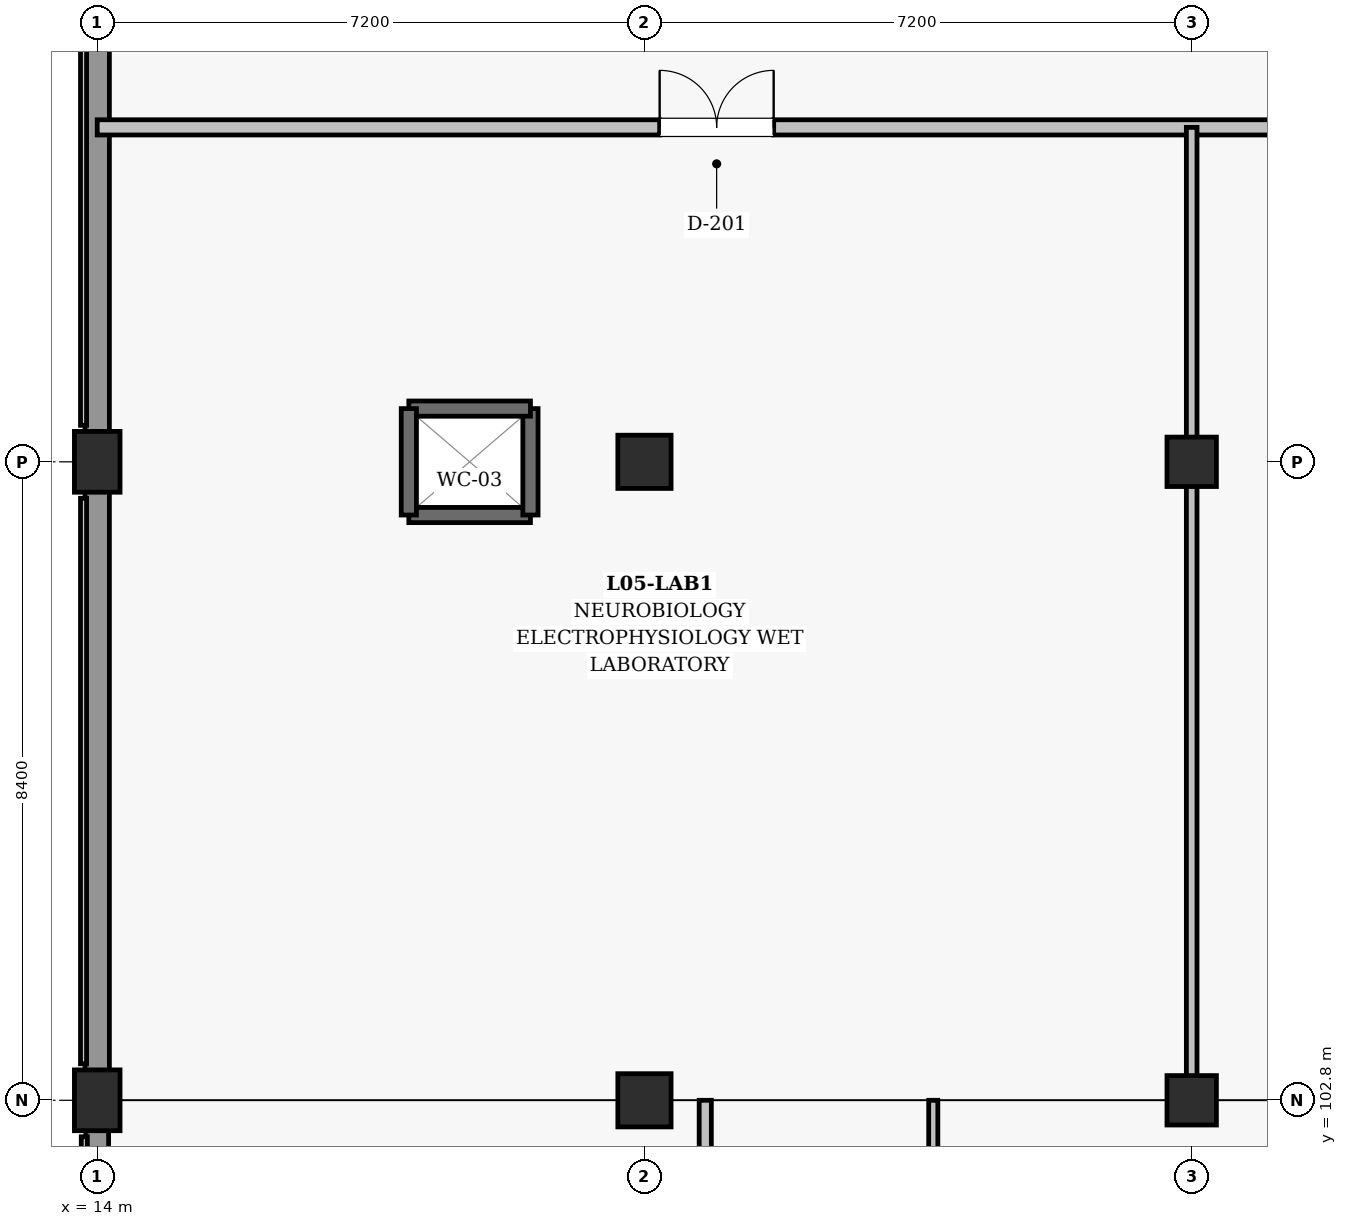
"""IFC4 building model, lengths in metres.
Left out: names, types, materials, properties, quantities, classifications, styles, units other than length and angle.
Written with IfcOpenShell. Run it as: python <this file> out.ifc"""

import sys

from ifc_helpers import new_model, si_unit, direction, frame, frame_2d, origin, origin_2d, place, context, subcontext, project, spatial, rectangle, extrude, element, fill, save


model = new_model("IFC4")
c1 = context("Model", 3, precision=1e-05, world=origin(), true_north=direction((0.0, 1.0)))
c2 = subcontext(c1, "Body", "Model", "MODEL_VIEW")
j1 = project(units=[si_unit("LENGTHUNIT", "METRE"), si_unit("PLANEANGLEUNIT", "RADIAN")], contexts=[c1])
p1 = place(None, origin())
s1 = spatial("IfcSite", under=j1, at=p1, CompositionType="ELEMENT")
p2 = place(p1, origin())
s2 = spatial("IfcBuilding", under=s1, at=p2, CompositionType="ELEMENT")
p3 = place(p2, frame((0.0, 0.0, 23.4)))
s3 = spatial("IfcBuildingStorey", under=s2, at=p3, CompositionType="ELEMENT", Elevation=23.4)
for number, where, z_axis, x_axis in (
    (1, (14.0, 102.8, 0.0), (0.0, 0.0, 1.0), (1.0, 0.0, 0.0)),
    (2, (14.0, 111.2, 0.0), (0.0, 0.0, 1.0), (1.0, 0.0, 0.0)),
):
    element("IfcColumn", number, at=place(p3, frame(where, z_axis=z_axis, x_axis=x_axis)), inside=s3, PredefinedType="COLUMN", context=c2, shape_type="SweptSolid", body=[
        extrude(rectangle(XDim=0.6, YDim=0.8, at=origin_2d()), origin(), (0.0, 0.0, 1.0), 4.5),
    ])
for number, where, z_axis, x_axis in (
    (3, (21.2, 102.8, 0.0), (0.0, 0.0, 1.0), (1.0, 0.0, 0.0)),
    (4, (21.2, 111.2, 0.0), (0.0, 0.0, 1.0), (1.0, 0.0, 0.0)),
):
    element("IfcColumn", number, at=place(p3, frame(where, z_axis=z_axis, x_axis=x_axis)), inside=s3, PredefinedType="COLUMN", context=c2, shape_type="SweptSolid", body=[
        extrude(rectangle(XDim=0.7, YDim=0.7, at=origin_2d()), origin(), (0.0, 0.0, 1.0), 4.5),
    ])
for number, where, z_axis, x_axis in (
    (5, (28.4, 102.8, 0.0), (0.0, 0.0, 1.0), (1.0, 0.0, 0.0)),
    (6, (28.4, 111.2, 0.0), (0.0, 0.0, 1.0), (1.0, 0.0, 0.0)),
):
    element("IfcColumn", number, at=place(p3, frame(where, z_axis=z_axis, x_axis=x_axis)), inside=s3, PredefinedType="COLUMN", context=c2, shape_type="SweptSolid", body=[
        extrude(rectangle(XDim=0.65, YDim=0.65, at=origin_2d()), origin(), (0.0, 0.0, 1.0), 4.5),
    ])
p4 = place(p3, frame((14.0, 103.18, 0.0), z_axis=(0.0, 0.0, 1.0), x_axis=(0.0, 1.0, 0.0)))
e7 = element("IfcWall", 7, at=p4, inside=s3, PredefinedType="SOLIDWALL", context=c2, shape_type="SweptSolid", body=[
    extrude(rectangle(XDim=7.64, YDim=0.32, at=frame_2d((3.82, 0.0))), origin(), (0.0, 0.0, 1.0), 3.355),
])
p5 = place(p3, frame((14.0, 111.58, 0.0), z_axis=(0.0, 0.0, 1.0), x_axis=(0.0, 1.0, 0.0)))
e8 = element("IfcWall", 8, at=p5, inside=s3, PredefinedType="SOLIDWALL", context=c2, shape_type="SweptSolid", body=[
    extrude(rectangle(XDim=7.715, YDim=0.32, at=frame_2d((3.857, 0.0))), origin(), (0.0, 0.0, 1.0), 3.405),
])
p6 = place(p3, frame((14.0, 94.755, 0.0), z_axis=(0.0, 0.0, 1.0), x_axis=(0.0, 1.0, 0.0)))
e9 = element("IfcWall", 9, at=p6, inside=s3, PredefinedType="SOLIDWALL", context=c2, shape_type="SweptSolid", body=[
    extrude(rectangle(XDim=7.665, YDim=0.3, at=frame_2d((3.833, 0.0))), origin(), (0.0, 0.0, 1.0), 3.355),
])
p7 = place(p3, frame((18.1, 110.5, 0.0), z_axis=(0.0, 0.0, 1.0), x_axis=(1.0, 0.0, 0.0)))
e10 = element("IfcWall", 10, at=p7, inside=s3, PredefinedType="SHEAR", context=c2, shape_type="SweptSolid", body=[
    extrude(rectangle(XDim=1.6, YDim=0.2, at=frame_2d((0.8, 0.0))), origin(), (0.0, 0.0, 1.0), 4.14),
])
p8 = place(p3, frame((19.7, 110.5, 0.0), z_axis=(0.0, 0.0, 1.0), x_axis=(0.0, 1.0, 0.0)))
e11 = element("IfcWall", 11, at=p8, inside=s3, PredefinedType="SHEAR", context=c2, shape_type="SweptSolid", body=[
    extrude(rectangle(XDim=1.4, YDim=0.2, at=frame_2d((0.7, 0.0))), origin(), (0.0, 0.0, 1.0), 4.14),
])
p9 = place(p3, frame((19.7, 111.9, 0.0), z_axis=(0.0, 0.0, 1.0), x_axis=(-1.0, 0.0, 0.0)))
e12 = element("IfcWall", 12, at=p9, inside=s3, PredefinedType="SHEAR", context=c2, shape_type="SweptSolid", body=[
    extrude(rectangle(XDim=1.6, YDim=0.2, at=frame_2d((0.8, 0.0))), origin(), (0.0, 0.0, 1.0), 4.14),
])
p10 = place(p3, frame((18.1, 111.9, 0.0), z_axis=(0.0, 0.0, 1.0), x_axis=(0.0, -1.0, 0.0)))
e13 = element("IfcWall", 13, at=p10, inside=s3, PredefinedType="SHEAR", context=c2, shape_type="SweptSolid", body=[
    extrude(rectangle(XDim=1.4, YDim=0.2, at=frame_2d((0.7, 0.0))), origin(), (0.0, 0.0, 1.0), 4.14),
])
p11 = place(p3, frame((14.0, 115.6, 0.0), z_axis=(0.0, 0.0, 1.0), x_axis=(1.0, 0.0, 0.0)))
e14 = element("IfcWall", 14, at=p11, inside=s3, PredefinedType="SOLIDWALL", context=c2, shape_type="SweptSolid", body=[
    extrude(rectangle(XDim=100.8, YDim=0.2, at=frame_2d((50.4, 0.0))), origin(), (0.0, 0.0, 1.0), 2.96),
])
p12 = place(p11, frame((29.9, 0.0, 0.0)))
e15 = element("IfcOpeningElement", 15, at=p12, cuts=e14, PredefinedType="OPENING", context=c2, shape_type="SweptSolid", body=[
    extrude(rectangle(XDim=1.1, YDim=2.15, at=frame_2d((0.55, 1.075))), frame((0.0, 0.11, 0.0), z_axis=(0.0, -1.0, 0.0), x_axis=(1.0, 0.0, 0.0)), (0.0, 0.0, 1.0), 0.22),
])
p13 = place(p11, frame((7.4, 0.0, 0.0)))
e16 = element("IfcOpeningElement", 16, at=p13, cuts=e14, PredefinedType="OPENING", context=c2, shape_type="SweptSolid", body=[
    extrude(rectangle(XDim=1.5, YDim=2.2, at=frame_2d((0.75, 1.1))), frame((0.0, 0.11, 0.0), z_axis=(0.0, -1.0, 0.0), x_axis=(1.0, 0.0, 0.0)), (0.0, 0.0, 1.0), 0.22),
])
p14 = place(p11, frame((23.8, 0.0, 0.0)))
e17 = element("IfcOpeningElement", 17, at=p14, cuts=e14, PredefinedType="OPENING", context=c2, shape_type="SweptSolid", body=[
    extrude(rectangle(XDim=1.5, YDim=2.2, at=frame_2d((0.75, 1.1))), frame((0.0, 0.11, 0.0), z_axis=(0.0, -1.0, 0.0), x_axis=(1.0, 0.0, 0.0)), (0.0, 0.0, 1.0), 0.22),
])
p15 = place(p11, frame((39.4, 0.0, 0.0)))
e18 = element("IfcOpeningElement", 18, at=p15, cuts=e14, PredefinedType="OPENING", context=c2, shape_type="SweptSolid", body=[
    extrude(rectangle(XDim=1.5, YDim=2.2, at=frame_2d((0.75, 1.1))), frame((0.0, 0.11, 0.0), z_axis=(0.0, -1.0, 0.0), x_axis=(1.0, 0.0, 0.0)), (0.0, 0.0, 1.0), 0.22),
])
p16 = place(p11, frame((54.9, 0.0, 0.0)))
e19 = element("IfcOpeningElement", 19, at=p16, cuts=e14, PredefinedType="OPENING", context=c2, shape_type="SweptSolid", body=[
    extrude(rectangle(XDim=1.5, YDim=2.2, at=frame_2d((0.75, 1.1))), frame((0.0, 0.11, 0.0), z_axis=(0.0, -1.0, 0.0), x_axis=(1.0, 0.0, 0.0)), (0.0, 0.0, 1.0), 0.22),
])
p17 = place(p11, frame((74.9, 0.0, 0.0)))
e20 = element("IfcOpeningElement", 20, at=p17, cuts=e14, PredefinedType="OPENING", context=c2, shape_type="SweptSolid", body=[
    extrude(rectangle(XDim=1.5, YDim=2.2, at=frame_2d((0.75, 1.1))), frame((0.0, 0.11, 0.0), z_axis=(0.0, -1.0, 0.0), x_axis=(1.0, 0.0, 0.0)), (0.0, 0.0, 1.0), 0.22),
])
p18 = place(p11, frame((91.6, 0.0, 0.0)))
e21 = element("IfcOpeningElement", 21, at=p18, cuts=e14, PredefinedType="OPENING", context=c2, shape_type="SweptSolid", body=[
    extrude(rectangle(XDim=1.5, YDim=2.2, at=frame_2d((0.75, 1.1))), frame((0.0, 0.11, 0.0), z_axis=(0.0, -1.0, 0.0), x_axis=(1.0, 0.0, 0.0)), (0.0, 0.0, 1.0), 0.22),
])
p19 = place(p3, frame((28.4, 102.8, 0.0), z_axis=(0.0, 0.0, 1.0), x_axis=(0.0, 1.0, 0.0)))
e22 = element("IfcWall", 22, at=p19, inside=s3, PredefinedType="PARTITIONING", context=c2, shape_type="SweptSolid", body=[
    extrude(rectangle(XDim=12.8, YDim=0.14, at=frame_2d((6.4, 0.0))), origin(), (0.0, 0.0, 1.0), 3.36),
])
p20 = place(p3, frame((25.0, 28.4, 0.0), z_axis=(0.0, 0.0, 1.0), x_axis=(0.0, 1.0, 0.0)))
e23 = element("IfcWall", 23, at=p20, inside=s3, PredefinedType="PARTITIONING", context=c2, shape_type="SweptSolid", body=[
    extrude(rectangle(XDim=74.4, YDim=0.12, at=frame_2d((37.2, 0.0))), origin(), (0.0, 0.0, 1.0), 3.38),
])
p21 = place(p20, frame((25.4, 0.0, 0.0)))
e24 = element("IfcOpeningElement", 24, at=p21, cuts=e23, PredefinedType="OPENING", context=c2, shape_type="SweptSolid", body=[
    extrude(rectangle(XDim=1.1, YDim=2.15, at=frame_2d((0.55, 1.075))), frame((0.0, 0.07, 0.0), z_axis=(0.0, -1.0, 0.0), x_axis=(1.0, 0.0, 0.0)), (0.0, 0.0, 1.0), 0.14),
])
p22 = place(p20, frame((58.7, 0.0, 0.0)))
e25 = element("IfcOpeningElement", 25, at=p22, cuts=e23, PredefinedType="OPENING", context=c2, shape_type="SweptSolid", body=[
    extrude(rectangle(XDim=1.18, YDim=2.2, at=frame_2d((0.59, 1.1))), frame((0.0, 0.07, 0.0), z_axis=(0.0, -1.0, 0.0), x_axis=(1.0, 0.0, 0.0)), (0.0, 0.0, 1.0), 0.14),
])
p23 = place(p20, frame((68.5, 0.0, 0.0)))
e26 = element("IfcOpeningElement", 26, at=p23, cuts=e23, PredefinedType="OPENING", context=c2, shape_type="SweptSolid", body=[
    extrude(rectangle(XDim=1.25, YDim=2.2, at=frame_2d((0.625, 1.1))), frame((0.0, 0.07, 0.0), z_axis=(0.0, -1.0, 0.0), x_axis=(1.0, 0.0, 0.0)), (0.0, 0.0, 1.0), 0.14),
])
p24 = place(p3, frame((22.0, 63.2, 0.0), z_axis=(0.0, 0.0, 1.0), x_axis=(0.0, 1.0, 0.0)))
e27 = element("IfcWall", 27, at=p24, inside=s3, PredefinedType="PARTITIONING", context=c2, shape_type="SweptSolid", body=[
    extrude(rectangle(XDim=39.6, YDim=0.16, at=frame_2d((19.8, 0.0))), origin(), (0.0, 0.0, 1.0), 3.38),
])
p25 = place(p24, frame((11.3, 0.0, 0.0)))
e28 = element("IfcOpeningElement", 28, at=p25, cuts=e27, PredefinedType="OPENING", context=c2, shape_type="SweptSolid", body=[
    extrude(rectangle(XDim=1.0, YDim=2.15, at=frame_2d((0.5, 1.075))), frame((0.0, 0.09, 0.0), z_axis=(0.0, -1.0, 0.0), x_axis=(1.0, 0.0, 0.0)), (0.0, 0.0, 1.0), 0.18),
])
p26 = place(p24, frame((26.3, 0.0, 0.0)))
e29 = element("IfcOpeningElement", 29, at=p26, cuts=e27, PredefinedType="OPENING", context=c2, shape_type="SweptSolid", body=[
    extrude(rectangle(XDim=1.1, YDim=2.15, at=frame_2d((0.55, 1.075))), frame((0.0, 0.09, 0.0), z_axis=(0.0, -1.0, 0.0), x_axis=(1.0, 0.0, 0.0)), (0.0, 0.0, 1.0), 0.18),
])
p27 = place(p13, origin())
e30 = element("IfcDoor", 30, at=p27, inside=s3, OperationType="DOUBLE_DOOR_SINGLE_SWING", PredefinedType="DOOR", context=c2, shape_type="SweptSolid", body=[
    extrude(rectangle(XDim=1.5, YDim=2.2, at=frame_2d((0.75, 1.1))), frame((0.0, 0.025, 0.0), z_axis=(0.0, -1.0, 0.0), x_axis=(1.0, 0.0, 0.0)), (0.0, 0.0, 1.0), 0.05),
])
fill(e16, e30)
save(model, sys.argv[1])
